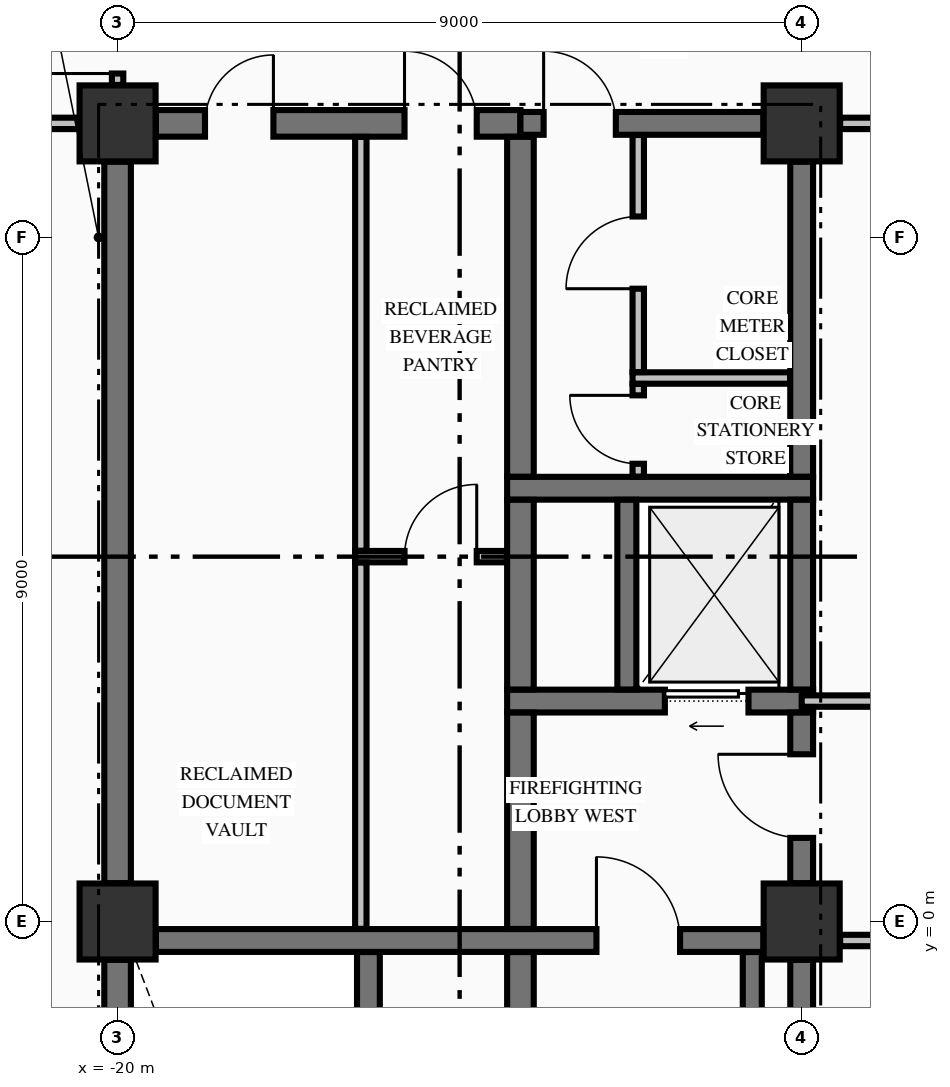
"""IFC4 building model, lengths in metres.
Left out: names, types, materials, properties, quantities, classifications, styles, units other than length and angle.
Written with IfcOpenShell. Run it as: python <this file> out.ifc"""

import sys

from ifc_helpers import new_model, si_unit, direction, frame, frame_2d, origin, origin_2d, place, context, subcontext, project, spatial, rectangle, extrude, element, fill, save


model = new_model("IFC4")
c1 = context("Model", 3, precision=1e-05, world=origin(), true_north=direction((0.0, 1.0)))
c2 = subcontext(c1, "Body", "Model", "MODEL_VIEW")
j1 = project(units=[si_unit("LENGTHUNIT", "METRE"), si_unit("PLANEANGLEUNIT", "RADIAN")], contexts=[c1])
p1 = place(None, origin())
s1 = spatial("IfcSite", under=j1, at=p1, CompositionType="ELEMENT")
p2 = place(p1, origin())
s2 = spatial("IfcBuilding", under=s1, at=p2, CompositionType="ELEMENT")
p3 = place(p2, frame((0.0, 0.0, 86.94)))
s3 = spatial("IfcBuildingStorey", under=s2, at=p3, CompositionType="ELEMENT", Elevation=86.94)
for number, where, z_axis, x_axis in (
    (1, (-20.0, 10.5, -0.425), (0.0, 0.0, 1.0), (1.0, 0.0, 0.0)),
    (2, (-11.0, 0.0, -0.425), (0.0, 0.0, 1.0), (1.0, 0.0, 0.0)),
    (3, (-11.0, 10.5, -0.425), (0.0, 0.0, 1.0), (1.0, 0.0, 0.0)),
    (4, (-20.0, 0.0, -0.425), (0.0, 0.0, 1.0), (1.0, 0.0, 0.0)),
):
    element("IfcColumn", number, at=place(p3, frame(where, z_axis=z_axis, x_axis=x_axis)), inside=s3, PredefinedType="COLUMN", context=c2, shape_type="SweptSolid", body=[
        extrude(rectangle(XDim=1.0, YDim=1.0, at=origin_2d()), origin(), (0.0, 0.0, 1.0), 4.595),
    ])
p4 = place(p3, frame((-19.496, -0.25, 0.0), z_axis=(0.0, 0.0, 1.0), x_axis=(1.0, 0.0, 0.0)))
e5 = element("IfcWall", 5, at=p4, inside=s3, PredefinedType="SHEAR", context=c2, shape_type="SweptSolid", body=[
    extrude(rectangle(XDim=7.992, YDim=0.3, at=frame_2d((3.996, 0.0))), origin(), (0.0, 0.0, 1.0), 4.17),
])
p5 = place(p4, frame((5.796, 0.0, 0.0)))
e6 = element("IfcOpeningElement", 6, at=p5, cuts=e5, PredefinedType="OPENING", context=c2, shape_type="SweptSolid", body=[
    extrude(rectangle(XDim=1.1, YDim=2.15, at=frame_2d((0.55, 1.075))), frame((0.0, 0.16, 0.0), z_axis=(0.0, -1.0, 0.0), x_axis=(1.0, 0.0, 0.0)), (0.0, 0.0, 1.0), 0.32),
])
p6 = place(p3, frame((-14.875, 2.9, 0.0), z_axis=(0.0, 0.0, 1.0), x_axis=(1.0, 0.0, 0.0)))
e7 = element("IfcWall", 7, at=p6, inside=s3, PredefinedType="SHEAR", context=c2, shape_type="SweptSolid", body=[
    extrude(rectangle(XDim=4.025, YDim=0.3, at=frame_2d((2.012, 0.0))), origin(), (0.0, 0.0, 1.0), 4.17),
])
p7 = place(p6, frame((2.075, 0.0, 0.0)))
e8 = element("IfcOpeningElement", 8, at=p7, cuts=e7, PredefinedType="OPENING", context=c2, shape_type="SweptSolid", body=[
    extrude(rectangle(XDim=1.1, YDim=2.2, at=frame_2d((0.55, 1.1))), frame((0.0, 0.16, 0.0), z_axis=(0.0, -1.0, 0.0), x_axis=(1.0, 0.0, 0.0)), (0.0, 0.0, 1.0), 0.32),
])
p8 = place(p3, frame((-14.875, 5.7, 0.0), z_axis=(0.0, 0.0, 1.0), x_axis=(1.0, 0.0, 0.0)))
e9 = element("IfcWall", 9, at=p8, inside=s3, PredefinedType="SHEAR", context=c2, shape_type="SweptSolid", body=[
    extrude(rectangle(XDim=4.025, YDim=0.3, at=frame_2d((2.012, 0.0))), origin(), (0.0, 0.0, 1.0), 4.17),
])
p9 = place(p3, frame((-19.496, 10.5, 0.0), z_axis=(0.0, 0.0, 1.0), x_axis=(1.0, 0.0, 0.0)))
e10 = element("IfcWall", 10, at=p9, inside=s3, PredefinedType="SHEAR", context=c2, shape_type="SweptSolid", body=[
    extrude(rectangle(XDim=4.796, YDim=0.35, at=frame_2d((2.398, 0.0))), origin(), (0.0, 0.0, 1.0), 4.17),
])
p10 = place(p9, frame((0.646, 0.0, 0.0)))
e11 = element("IfcOpeningElement", 11, at=p10, cuts=e10, PredefinedType="OPENING", context=c2, shape_type="SweptSolid", body=[
    extrude(rectangle(XDim=0.9, YDim=2.15, at=frame_2d((0.45, 1.075))), frame((0.0, 0.185, 0.0), z_axis=(0.0, -1.0, 0.0), x_axis=(1.0, 0.0, 0.0)), (0.0, 0.0, 1.0), 0.37),
])
p11 = place(p9, frame((3.271, 0.0, 0.0)))
e12 = element("IfcOpeningElement", 12, at=p11, cuts=e10, PredefinedType="OPENING", context=c2, shape_type="SweptSolid", body=[
    extrude(rectangle(XDim=0.95, YDim=2.15, at=frame_2d((0.475, 1.075))), frame((0.0, 0.185, 0.0), z_axis=(0.0, -1.0, 0.0), x_axis=(1.0, 0.0, 0.0)), (0.0, 0.0, 1.0), 0.37),
])
p12 = place(p3, frame((-14.7, 10.5, 0.0), z_axis=(0.0, 0.0, 1.0), x_axis=(1.0, 0.0, 0.0)))
e13 = element("IfcWall", 13, at=p12, inside=s3, PredefinedType="SHEAR", context=c2, shape_type="SweptSolid", body=[
    extrude(rectangle(XDim=3.196, YDim=0.3, at=frame_2d((1.598, 0.0))), origin(), (0.0, 0.0, 1.0), 4.17),
])
p13 = place(p12, frame((0.305, 0.0, 0.0)))
e14 = element("IfcOpeningElement", 14, at=p13, cuts=e13, PredefinedType="OPENING", context=c2, shape_type="SweptSolid", body=[
    extrude(rectangle(XDim=0.95, YDim=2.15, at=frame_2d((0.475, 1.075))), frame((0.0, 0.16, 0.0), z_axis=(0.0, -1.0, 0.0), x_axis=(1.0, 0.0, 0.0)), (0.0, 0.0, 1.0), 0.32),
])
p14 = place(p3, frame((-10.494, -0.25, 0.0), z_axis=(0.0, 0.0, 1.0), x_axis=(1.0, 0.0, 0.0)))
e15 = element("IfcWall", 15, at=p14, inside=s3, PredefinedType="PARTITIONING", context=c2, shape_type="SweptSolid", body=[
    extrude(rectangle(XDim=20.988, YDim=0.15, at=frame_2d((10.494, 0.0))), origin(), (0.0, 0.0, 1.0), 4.17),
])
p15 = place(p14, frame((6.944, 0.0, 0.0)))
e16 = element("IfcOpeningElement", 16, at=p15, cuts=e15, PredefinedType="OPENING", context=c2, shape_type="SweptSolid", body=[
    extrude(rectangle(XDim=1.1, YDim=2.15, at=frame_2d((0.55, 1.075))), frame((0.0, 0.085, 0.0), z_axis=(0.0, -1.0, 0.0), x_axis=(1.0, 0.0, 0.0)), (0.0, 0.0, 1.0), 0.17),
])
p16 = place(p14, frame((2.419, 0.0, 0.0)))
e17 = element("IfcOpeningElement", 17, at=p16, cuts=e15, PredefinedType="OPENING", context=c2, shape_type="SweptSolid", body=[
    extrude(rectangle(XDim=1.05, YDim=2.15, at=frame_2d((0.525, 1.075))), frame((0.0, 0.085, 0.0), z_axis=(0.0, -1.0, 0.0), x_axis=(1.0, 0.0, 0.0)), (0.0, 0.0, 1.0), 0.17),
])
p17 = place(p14, frame((14.569, 0.0, 0.0)))
e18 = element("IfcOpeningElement", 18, at=p17, cuts=e15, PredefinedType="OPENING", context=c2, shape_type="SweptSolid", body=[
    extrude(rectangle(XDim=0.95, YDim=2.15, at=frame_2d((0.475, 1.075))), frame((0.0, 0.085, 0.0), z_axis=(0.0, -1.0, 0.0), x_axis=(1.0, 0.0, 0.0)), (0.0, 0.0, 1.0), 0.17),
])
p18 = place(p3, frame((-11.0, 2.9, 0.0), z_axis=(0.0, 0.0, 1.0), x_axis=(1.0, 0.0, 0.0)))
e19 = element("IfcWall", 19, at=p18, inside=s3, PredefinedType="PARTITIONING", context=c2, shape_type="SweptSolid", body=[
    extrude(rectangle(XDim=22.0, YDim=0.15, at=frame_2d((11.0, 0.0))), origin(), (0.0, 0.0, 1.0), 4.17),
])
p19 = place(p18, frame((7.45, 0.0, 0.0)))
e20 = element("IfcOpeningElement", 20, at=p19, cuts=e19, PredefinedType="OPENING", context=c2, shape_type="SweptSolid", body=[
    extrude(rectangle(XDim=1.1, YDim=2.15, at=frame_2d((0.55, 1.075))), frame((0.0, 0.085, 0.0), z_axis=(0.0, -1.0, 0.0), x_axis=(1.0, 0.0, 0.0)), (0.0, 0.0, 1.0), 0.17),
])
p20 = place(p18, frame((2.925, 0.0, 0.0)))
e21 = element("IfcOpeningElement", 21, at=p20, cuts=e19, PredefinedType="OPENING", context=c2, shape_type="SweptSolid", body=[
    extrude(rectangle(XDim=1.05, YDim=2.15, at=frame_2d((0.525, 1.075))), frame((0.0, 0.085, 0.0), z_axis=(0.0, -1.0, 0.0), x_axis=(1.0, 0.0, 0.0)), (0.0, 0.0, 1.0), 0.17),
])
p21 = place(p18, frame((11.275, 0.0, 0.0)))
e22 = element("IfcOpeningElement", 22, at=p21, cuts=e19, PredefinedType="OPENING", context=c2, shape_type="SweptSolid", body=[
    extrude(rectangle(XDim=0.95, YDim=2.15, at=frame_2d((0.475, 1.075))), frame((0.0, 0.085, 0.0), z_axis=(0.0, -1.0, 0.0), x_axis=(1.0, 0.0, 0.0)), (0.0, 0.0, 1.0), 0.17),
])
p22 = place(p18, frame((17.725, 0.0, 0.0)))
e23 = element("IfcOpeningElement", 23, at=p22, cuts=e19, PredefinedType="OPENING", context=c2, shape_type="SweptSolid", body=[
    extrude(rectangle(XDim=0.95, YDim=2.15, at=frame_2d((0.475, 1.075))), frame((0.0, 0.085, 0.0), z_axis=(0.0, -1.0, 0.0), x_axis=(1.0, 0.0, 0.0)), (0.0, 0.0, 1.0), 0.17),
])
p23 = place(p3, frame((-16.875, 4.8, 0.0), z_axis=(0.0, 0.0, 1.0), x_axis=(1.0, 0.0, 0.0)))
e24 = element("IfcWall", 24, at=p23, inside=s3, PredefinedType="PARTITIONING", context=c2, shape_type="SweptSolid", body=[
    extrude(rectangle(XDim=1.997, YDim=0.15, at=frame_2d((0.999, 0.0))), origin(), (0.0, 0.0, 1.0), 4.17),
])
p24 = place(p23, frame((0.65, 0.0, 0.0)))
e25 = element("IfcOpeningElement", 25, at=p24, cuts=e24, PredefinedType="OPENING", context=c2, shape_type="SweptSolid", body=[
    extrude(rectangle(XDim=0.95, YDim=2.15, at=frame_2d((0.475, 1.075))), frame((0.0, 0.085, 0.0), z_axis=(0.0, -1.0, 0.0), x_axis=(1.0, 0.0, 0.0)), (0.0, 0.0, 1.0), 0.17),
])
p25 = place(p3, frame((-13.225, 7.15, 0.0), z_axis=(0.0, 0.0, 1.0), x_axis=(1.0, 0.0, 0.0)))
e26 = element("IfcWall", 26, at=p25, inside=s3, PredefinedType="PARTITIONING", context=c2, shape_type="SweptSolid", body=[
    extrude(rectangle(XDim=2.072, YDim=0.15, at=frame_2d((1.036, 0.0))), origin(), (0.0, 0.0, 1.0), 4.17),
])
p26 = place(p3, frame((-22.835, 10.5, 0.0), z_axis=(0.0, 0.0, 1.0), x_axis=(1.0, 0.0, 0.0)))
e27 = element("IfcWall", 27, at=p26, inside=s3, PredefinedType="PARTITIONING", context=c2, shape_type="SweptSolid", body=[
    extrude(rectangle(XDim=2.329, YDim=0.15, at=frame_2d((1.165, 0.0))), origin(), (0.0, 0.0, 1.0), 4.17),
])
p27 = place(p26, frame((0.835, 0.0, 0.0)))
e28 = element("IfcOpeningElement", 28, at=p27, cuts=e27, PredefinedType="OPENING", context=c2, shape_type="SweptSolid", body=[
    extrude(rectangle(XDim=1.0, YDim=2.15, at=frame_2d((0.5, 1.075))), frame((0.0, 0.085, 0.0), z_axis=(0.0, -1.0, 0.0), x_axis=(1.0, 0.0, 0.0)), (0.0, 0.0, 1.0), 0.17),
])
p28 = place(p3, frame((-10.494, 10.5, 0.0), z_axis=(0.0, 0.0, 1.0), x_axis=(1.0, 0.0, 0.0)))
e29 = element("IfcWall", 29, at=p28, inside=s3, PredefinedType="PARTITIONING", context=c2, shape_type="SweptSolid", body=[
    extrude(rectangle(XDim=20.988, YDim=0.15, at=frame_2d((10.494, 0.0))), origin(), (0.0, 0.0, 1.0), 4.17),
])
p29 = place(p28, frame((6.944, 0.0, 0.0)))
e30 = element("IfcOpeningElement", 30, at=p29, cuts=e29, PredefinedType="OPENING", context=c2, shape_type="SweptSolid", body=[
    extrude(rectangle(XDim=1.1, YDim=2.15, at=frame_2d((0.55, 1.075))), frame((0.0, 0.085, 0.0), z_axis=(0.0, -1.0, 0.0), x_axis=(1.0, 0.0, 0.0)), (0.0, 0.0, 1.0), 0.17),
])
p30 = place(p3, frame((-20.0, -9.446, 0.0), z_axis=(0.0, 0.0, 1.0), x_axis=(0.0, 1.0, 0.0)))
e31 = element("IfcWall", 31, at=p30, inside=s3, PredefinedType="SHEAR", context=c2, shape_type="SweptSolid", body=[
    extrude(rectangle(XDim=8.942, YDim=0.35, at=frame_2d((4.471, 0.0))), origin(), (0.0, 0.0, 1.0), 4.17),
])
p31 = place(p3, frame((-20.0, 0.504, 0.0), z_axis=(0.0, 0.0, 1.0), x_axis=(0.0, 1.0, 0.0)))
e32 = element("IfcWall", 32, at=p31, inside=s3, PredefinedType="SHEAR", context=c2, shape_type="SweptSolid", body=[
    extrude(rectangle(XDim=9.492, YDim=0.35, at=frame_2d((4.746, 0.0))), origin(), (0.0, 0.0, 1.0), 4.17),
])
p32 = place(p3, frame((-16.7, -9.773, 0.0), z_axis=(0.0, 0.0, 1.0), x_axis=(0.0, 1.0, 0.0)))
e33 = element("IfcWall", 33, at=p32, inside=s3, PredefinedType="SHEAR", context=c2, shape_type="SweptSolid", body=[
    extrude(rectangle(XDim=9.371, YDim=0.3, at=frame_2d((4.686, 0.0))), origin(), (0.0, 0.0, 1.0), 4.17),
])
p33 = place(p3, frame((-14.7, -9.773, 0.0), z_axis=(0.0, 0.0, 1.0), x_axis=(0.0, 1.0, 0.0)))
e34 = element("IfcWall", 34, at=p33, inside=s3, PredefinedType="SHEAR", context=c2, shape_type="SweptSolid", body=[
    extrude(rectangle(XDim=9.371, YDim=0.35, at=frame_2d((4.686, 0.0))), origin(), (0.0, 0.0, 1.0), 4.17),
])
p34 = place(p3, frame((-14.7, -0.098, 0.0), z_axis=(0.0, 0.0, 1.0), x_axis=(0.0, 1.0, 0.0)))
e35 = element("IfcWall", 35, at=p34, inside=s3, PredefinedType="SHEAR", context=c2, shape_type="SweptSolid", body=[
    extrude(rectangle(XDim=2.846, YDim=0.35, at=frame_2d((1.423, 0.0))), origin(), (0.0, 0.0, 1.0), 4.17),
])
p35 = place(p3, frame((-14.7, 3.052, 0.0), z_axis=(0.0, 0.0, 1.0), x_axis=(0.0, 1.0, 0.0)))
e36 = element("IfcWall", 36, at=p35, inside=s3, PredefinedType="SHEAR", context=c2, shape_type="SweptSolid", body=[
    extrude(rectangle(XDim=2.496, YDim=0.35, at=frame_2d((1.248, 0.0))), origin(), (0.0, 0.0, 1.0), 4.17),
])
p36 = place(p3, frame((-14.7, 5.852, 0.0), z_axis=(0.0, 0.0, 1.0), x_axis=(0.0, 1.0, 0.0)))
e37 = element("IfcWall", 37, at=p36, inside=s3, PredefinedType="SHEAR", context=c2, shape_type="SweptSolid", body=[
    extrude(rectangle(XDim=4.471, YDim=0.35, at=frame_2d((2.235, 0.0))), origin(), (0.0, 0.0, 1.0), 4.17),
])
p37 = place(p3, frame((-13.3, 3.052, 0.0), z_axis=(0.0, 0.0, 1.0), x_axis=(0.0, 1.0, 0.0)))
e38 = element("IfcWall", 38, at=p37, inside=s3, PredefinedType="SOLIDWALL", context=c2, shape_type="SweptSolid", body=[
    extrude(rectangle(XDim=2.496, YDim=0.25, at=frame_2d((1.248, 0.0))), origin(), (0.0, 0.0, 1.0), 4.17),
])
p38 = place(p3, frame((-11.65, -9.798, 0.0), z_axis=(0.0, 0.0, 1.0), x_axis=(0.0, 1.0, 0.0)))
e39 = element("IfcWall", 39, at=p38, inside=s3, PredefinedType="SOLIDWALL", context=c2, shape_type="SweptSolid", body=[
    extrude(rectangle(XDim=9.396, YDim=0.25, at=frame_2d((4.698, 0.0))), origin(), (0.0, 0.0, 1.0), 4.17),
])
p39 = place(p3, frame((-11.0, -9.446, 0.0), z_axis=(0.0, 0.0, 1.0), x_axis=(0.0, 1.0, 0.0)))
e40 = element("IfcWall", 40, at=p39, inside=s3, PredefinedType="SHEAR", context=c2, shape_type="SweptSolid", body=[
    extrude(rectangle(XDim=8.942, YDim=0.3, at=frame_2d((4.471, 0.0))), origin(), (0.0, 0.0, 1.0), 4.17),
])
p40 = place(p3, frame((-11.0, 0.504, 0.0), z_axis=(0.0, 0.0, 1.0), x_axis=(0.0, 1.0, 0.0)))
e41 = element("IfcWall", 41, at=p40, inside=s3, PredefinedType="SHEAR", context=c2, shape_type="SweptSolid", body=[
    extrude(rectangle(XDim=2.244, YDim=0.3, at=frame_2d((1.122, 0.0))), origin(), (0.0, 0.0, 1.0), 4.17),
])
p41 = place(p40, frame((0.596, 0.0, 0.0)))
e42 = element("IfcOpeningElement", 42, at=p41, cuts=e41, PredefinedType="OPENING", context=c2, shape_type="SweptSolid", body=[
    extrude(rectangle(XDim=1.1, YDim=2.15, at=frame_2d((0.55, 1.075))), frame((0.0, 0.16, 0.0), z_axis=(0.0, -1.0, 0.0), x_axis=(1.0, 0.0, 0.0)), (0.0, 0.0, 1.0), 0.32),
])
p42 = place(p3, frame((-11.0, 3.052, 0.0), z_axis=(0.0, 0.0, 1.0), x_axis=(0.0, 1.0, 0.0)))
e43 = element("IfcWall", 43, at=p42, inside=s3, PredefinedType="SHEAR", context=c2, shape_type="SweptSolid", body=[
    extrude(rectangle(XDim=2.496, YDim=0.3, at=frame_2d((1.248, 0.0))), origin(), (0.0, 0.0, 1.0), 4.17),
])
p43 = place(p3, frame((-11.0, 5.852, 0.0), z_axis=(0.0, 0.0, 1.0), x_axis=(0.0, 1.0, 0.0)))
e44 = element("IfcWall", 44, at=p43, inside=s3, PredefinedType="SHEAR", context=c2, shape_type="SweptSolid", body=[
    extrude(rectangle(XDim=4.144, YDim=0.3, at=frame_2d((2.072, 0.0))), origin(), (0.0, 0.0, 1.0), 4.17),
])
p44 = place(p3, frame((-20.0, 11.006, 0.0), z_axis=(0.0, 0.0, 1.0), x_axis=(0.0, 1.0, 0.0)))
e45 = element("IfcWall", 45, at=p44, inside=s3, PredefinedType="PARTITIONING", context=c2, shape_type="SweptSolid", body=[
    extrude(rectangle(XDim=1.466, YDim=0.15, at=frame_2d((0.733, 0.0))), origin(), (0.0, 0.0, 1.0), 3.36),
])
p45 = place(p44, frame((0.15, 0.0, 0.0)))
e46 = element("IfcOpeningElement", 46, at=p45, cuts=e45, PredefinedType="OPENING", context=c2, shape_type="SweptSolid", body=[
    extrude(rectangle(XDim=0.95, YDim=2.15, at=frame_2d((0.475, 1.075))), frame((0.0, 0.085, 0.0), z_axis=(0.0, -1.0, 0.0), x_axis=(1.0, 0.0, 0.0)), (0.0, 0.0, 1.0), 0.17),
])
p46 = place(p3, frame((-16.8, -0.097, 0.0), z_axis=(0.0, 0.0, 1.0), x_axis=(0.0, 1.0, 0.0)))
e47 = element("IfcWall", 47, at=p46, inside=s3, PredefinedType="PARTITIONING", context=c2, shape_type="SweptSolid", body=[
    extrude(rectangle(XDim=4.819, YDim=0.15, at=frame_2d((2.409, 0.0))), origin(), (0.0, 0.0, 1.0), 4.17),
])
p47 = place(p3, frame((-16.8, 4.878, 0.0), z_axis=(0.0, 0.0, 1.0), x_axis=(0.0, 1.0, 0.0)))
e48 = element("IfcWall", 48, at=p47, inside=s3, PredefinedType="PARTITIONING", context=c2, shape_type="SweptSolid", body=[
    extrude(rectangle(XDim=5.444, YDim=0.15, at=frame_2d((2.722, 0.0))), origin(), (0.0, 0.0, 1.0), 4.17),
])
p48 = place(p3, frame((-13.15, 5.853, 0.0), z_axis=(0.0, 0.0, 1.0), x_axis=(0.0, 1.0, 0.0)))
e49 = element("IfcWall", 49, at=p48, inside=s3, PredefinedType="PARTITIONING", context=c2, shape_type="SweptSolid", body=[
    extrude(rectangle(XDim=1.219, YDim=0.15, at=frame_2d((0.609, 0.0))), origin(), (0.0, 0.0, 1.0), 4.17),
])
p49 = place(p48, frame((0.169, 0.0, 0.0)))
e50 = element("IfcOpeningElement", 50, at=p49, cuts=e49, PredefinedType="OPENING", context=c2, shape_type="SweptSolid", body=[
    extrude(rectangle(XDim=0.9, YDim=2.15, at=frame_2d((0.45, 1.075))), frame((0.0, 0.085, 0.0), z_axis=(0.0, -1.0, 0.0), x_axis=(1.0, 0.0, 0.0)), (0.0, 0.0, 1.0), 0.17),
])
p50 = place(p3, frame((-13.15, 7.228, 0.0), z_axis=(0.0, 0.0, 1.0), x_axis=(0.0, 1.0, 0.0)))
e51 = element("IfcWall", 51, at=p50, inside=s3, PredefinedType="PARTITIONING", context=c2, shape_type="SweptSolid", body=[
    extrude(rectangle(XDim=3.119, YDim=0.15, at=frame_2d((1.56, 0.0))), origin(), (0.0, 0.0, 1.0), 4.17),
])
p51 = place(p50, frame((1.097, 0.0, 0.0)))
e52 = element("IfcOpeningElement", 52, at=p51, cuts=e51, PredefinedType="OPENING", context=c2, shape_type="SweptSolid", body=[
    extrude(rectangle(XDim=0.95, YDim=2.15, at=frame_2d((0.475, 1.075))), frame((0.0, 0.085, 0.0), z_axis=(0.0, -1.0, 0.0), x_axis=(1.0, 0.0, 0.0)), (0.0, 0.0, 1.0), 0.17),
])
p52 = place(p5, origin())
e53 = element("IfcDoor", 53, at=p52, inside=s3, OperationType="SINGLE_SWING_LEFT", PredefinedType="DOOR", context=c2, shape_type="SweptSolid", body=[
    extrude(rectangle(XDim=1.1, YDim=2.15, at=frame_2d((0.55, 1.075))), frame((0.0, 0.025, 0.0), z_axis=(0.0, -1.0, 0.0), x_axis=(1.0, 0.0, 0.0)), (0.0, 0.0, 1.0), 0.05),
])
fill(e6, e53)
p53 = place(p41, origin())
e54 = element("IfcDoor", 54, at=p53, inside=s3, OperationType="SINGLE_SWING_RIGHT", PredefinedType="DOOR", context=c2, shape_type="SweptSolid", body=[
    extrude(rectangle(XDim=1.1, YDim=2.15, at=frame_2d((0.55, 1.075))), frame((0.0, 0.025, 0.0), z_axis=(0.0, -1.0, 0.0), x_axis=(1.0, 0.0, 0.0)), (0.0, 0.0, 1.0), 0.05),
])
fill(e42, e54)
p54 = place(p7, origin())
e55 = element("IfcDoor", 55, at=p54, inside=s3, OperationType="SLIDING_TO_LEFT", PredefinedType="DOOR", context=c2, shape_type="SweptSolid", body=[
    extrude(rectangle(XDim=1.1, YDim=2.2, at=frame_2d((0.55, 1.1))), frame((0.0, 0.025, 0.0), z_axis=(0.0, -1.0, 0.0), x_axis=(1.0, 0.0, 0.0)), (0.0, 0.0, 1.0), 0.05),
])
fill(e8, e55)
p55 = place(p13, origin())
e56 = element("IfcDoor", 56, at=p55, inside=s3, OperationType="SINGLE_SWING_LEFT", PredefinedType="DOOR", context=c2, shape_type="SweptSolid", body=[
    extrude(rectangle(XDim=0.95, YDim=2.15, at=frame_2d((0.475, 1.075))), frame((0.0, 0.025, 0.0), z_axis=(0.0, -1.0, 0.0), x_axis=(1.0, 0.0, 0.0)), (0.0, 0.0, 1.0), 0.05),
])
fill(e14, e56)
p56 = place(p49, origin())
e57 = element("IfcDoor", 57, at=p56, inside=s3, OperationType="SINGLE_SWING_RIGHT", PredefinedType="DOOR", context=c2, shape_type="SweptSolid", body=[
    extrude(rectangle(XDim=0.9, YDim=2.15, at=frame_2d((0.45, 1.075))), frame((0.0, 0.025, 0.0), z_axis=(0.0, -1.0, 0.0), x_axis=(1.0, 0.0, 0.0)), (0.0, 0.0, 1.0), 0.05),
])
fill(e50, e57)
p57 = place(p51, origin())
e58 = element("IfcDoor", 58, at=p57, inside=s3, OperationType="SINGLE_SWING_LEFT", PredefinedType="DOOR", context=c2, shape_type="SweptSolid", body=[
    extrude(rectangle(XDim=0.95, YDim=2.15, at=frame_2d((0.475, 1.075))), frame((0.0, 0.025, 0.0), z_axis=(0.0, -1.0, 0.0), x_axis=(1.0, 0.0, 0.0)), (0.0, 0.0, 1.0), 0.05),
])
fill(e52, e58)
p58 = place(p10, origin())
e59 = element("IfcDoor", 59, at=p58, inside=s3, OperationType="SINGLE_SWING_RIGHT", PredefinedType="DOOR", context=c2, shape_type="SweptSolid", body=[
    extrude(rectangle(XDim=0.9, YDim=2.15, at=frame_2d((0.45, 1.075))), frame((0.0, 0.025, 0.0), z_axis=(0.0, -1.0, 0.0), x_axis=(1.0, 0.0, 0.0)), (0.0, 0.0, 1.0), 0.05),
])
fill(e11, e59)
p59 = place(p11, origin())
e60 = element("IfcDoor", 60, at=p59, inside=s3, OperationType="SINGLE_SWING_LEFT", PredefinedType="DOOR", context=c2, shape_type="SweptSolid", body=[
    extrude(rectangle(XDim=0.95, YDim=2.15, at=frame_2d((0.475, 1.075))), frame((0.0, 0.025, 0.0), z_axis=(0.0, -1.0, 0.0), x_axis=(1.0, 0.0, 0.0)), (0.0, 0.0, 1.0), 0.05),
])
fill(e12, e60)
p60 = place(p24, origin())
e61 = element("IfcDoor", 61, at=p60, inside=s3, OperationType="SINGLE_SWING_RIGHT", PredefinedType="DOOR", context=c2, shape_type="SweptSolid", body=[
    extrude(rectangle(XDim=0.95, YDim=2.15, at=frame_2d((0.475, 1.075))), frame((0.0, 0.025, 0.0), z_axis=(0.0, -1.0, 0.0), x_axis=(1.0, 0.0, 0.0)), (0.0, 0.0, 1.0), 0.05),
])
fill(e25, e61)
p61 = place(p45, origin())
e62 = element("IfcDoor", 62, at=p61, inside=s3, OperationType="SINGLE_SWING_LEFT", PredefinedType="DOOR", context=c2, shape_type="SweptSolid", body=[
    extrude(rectangle(XDim=0.95, YDim=2.15, at=frame_2d((0.475, 1.075))), frame((0.0, 0.025, 0.0), z_axis=(0.0, -1.0, 0.0), x_axis=(1.0, 0.0, 0.0)), (0.0, 0.0, 1.0), 0.05),
])
fill(e46, e62)
save(model, sys.argv[1])
